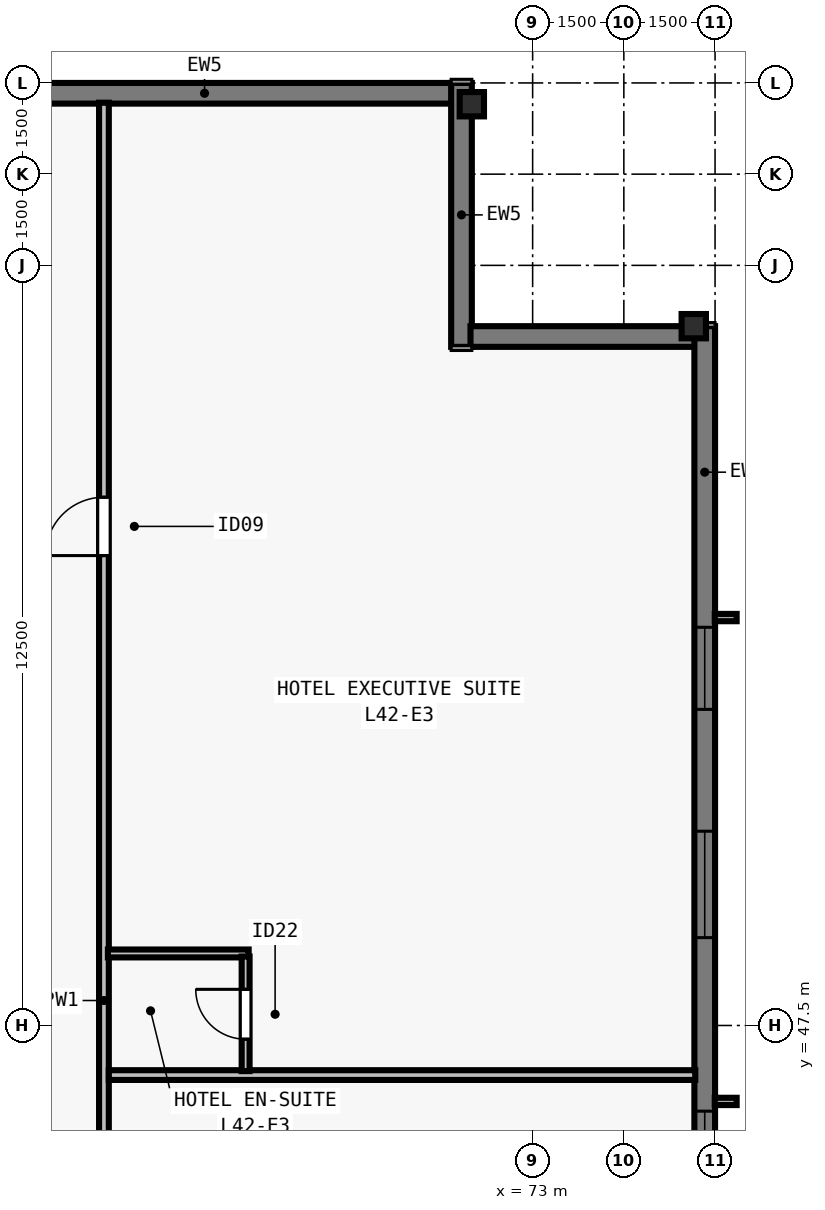
"""IFC4 building model, lengths in metres.
Left out: names, types, materials, properties, quantities, classifications, styles, units other than length and angle.
Written with IfcOpenShell. Run it as: python <this file> out.ifc"""

import sys

from ifc_helpers import new_model, si_unit, direction, frame, frame_2d, origin, origin_2d, place, context, subcontext, project, spatial, rectangle, i_section, extrude, element, fill, save


model = new_model("IFC4")
c1 = context("Model", 3, precision=1e-05, world=origin(), true_north=direction((0.0, 1.0)))
c2 = subcontext(c1, "Body", "Model", "MODEL_VIEW")
j1 = project(units=[si_unit("LENGTHUNIT", "METRE"), si_unit("PLANEANGLEUNIT", "RADIAN")], contexts=[c1])
p1 = place(None, origin())
s1 = spatial("IfcSite", under=j1, at=p1, CompositionType="ELEMENT")
p2 = place(p1, origin())
s2 = spatial("IfcBuilding", under=s1, at=p2, CompositionType="ELEMENT")
p3 = place(p2, frame((0.0, 0.0, 155.0)))
s3 = spatial("IfcBuildingStorey", under=s2, at=p3, CompositionType="ELEMENT", Elevation=155.0)
for number, where, z_axis, x_axis in (
    (1, (75.65, 59.0, 0.0), (0.0, 0.0, 1.0), (0.0, 1.0, 0.0)),
    (2, (72.0, 62.65, 0.0), (0.0, 0.0, 1.0), (1.0, 0.0, 0.0)),
):
    element("IfcColumn", number, at=place(p3, frame(where, z_axis=z_axis, x_axis=x_axis)), inside=s3, PredefinedType="COLUMN", context=c2, shape_type="SweptSolid", body=[
        extrude(i_section(OverallWidth=0.4, OverallDepth=0.4, WebThickness=0.022, FlangeThickness=0.036, at=origin_2d()), origin(), (0.0, 0.0, 1.0), 3.5),
    ])
p4 = place(p3, frame((32.0, 62.83, 0.0), z_axis=(0.0, 0.0, 1.0), x_axis=(1.0, 0.0, 0.0)))
e3 = element("IfcWall", 3, at=p4, inside=s3, PredefinedType="SOLIDWALL", context=c2, shape_type="SweptSolid", body=[
    extrude(rectangle(XDim=39.682, YDim=0.34, at=frame_2d((19.841, 0.0))), origin(), (0.0, 0.0, 1.0), 3.28),
])
p5 = place(p4, frame((4.952, 0.0, 0.8)))
e4 = element("IfcOpeningElement", 4, at=p5, cuts=e3, PredefinedType="OPENING", context=c2, shape_type="SweptSolid", body=[
    extrude(rectangle(XDim=1.35, YDim=1.66, at=frame_2d((0.675, 0.83))), frame((0.0, 0.18, 0.0), z_axis=(0.0, -1.0, 0.0), x_axis=(1.0, 0.0, 0.0)), (0.0, 0.0, 1.0), 0.36),
])
p6 = place(p4, frame((12.059, 0.0, 0.8)))
e5 = element("IfcOpeningElement", 5, at=p6, cuts=e3, PredefinedType="OPENING", context=c2, shape_type="SweptSolid", body=[
    extrude(rectangle(XDim=1.35, YDim=1.66, at=frame_2d((0.675, 0.83))), frame((0.0, 0.18, 0.0), z_axis=(0.0, -1.0, 0.0), x_axis=(1.0, 0.0, 0.0)), (0.0, 0.0, 1.0), 0.36),
])
p7 = place(p4, frame((16.262, 0.0, 0.8)))
e6 = element("IfcOpeningElement", 6, at=p7, cuts=e3, PredefinedType="OPENING", context=c2, shape_type="SweptSolid", body=[
    extrude(rectangle(XDim=1.75, YDim=1.66, at=frame_2d((0.875, 0.83))), frame((0.0, 0.18, 0.0), z_axis=(0.0, -1.0, 0.0), x_axis=(1.0, 0.0, 0.0)), (0.0, 0.0, 1.0), 0.36),
])
p8 = place(p4, frame((18.316, 0.0, 0.8)))
e7 = element("IfcOpeningElement", 7, at=p8, cuts=e3, PredefinedType="OPENING", context=c2, shape_type="SweptSolid", body=[
    extrude(rectangle(XDim=1.35, YDim=1.66, at=frame_2d((0.675, 0.83))), frame((0.0, 0.18, 0.0), z_axis=(0.0, -1.0, 0.0), x_axis=(1.0, 0.0, 0.0)), (0.0, 0.0, 1.0), 0.36),
])
p9 = place(p4, frame((22.07, 0.0, 0.8)))
e8 = element("IfcOpeningElement", 8, at=p9, cuts=e3, PredefinedType="OPENING", context=c2, shape_type="SweptSolid", body=[
    extrude(rectangle(XDim=1.75, YDim=1.66, at=frame_2d((0.875, 0.83))), frame((0.0, 0.18, 0.0), z_axis=(0.0, -1.0, 0.0), x_axis=(1.0, 0.0, 0.0)), (0.0, 0.0, 1.0), 0.36),
])
p10 = place(p4, frame((26.273, 0.0, 0.8)))
e9 = element("IfcOpeningElement", 9, at=p10, cuts=e3, PredefinedType="OPENING", context=c2, shape_type="SweptSolid", body=[
    extrude(rectangle(XDim=1.35, YDim=1.66, at=frame_2d((0.675, 0.83))), frame((0.0, 0.18, 0.0), z_axis=(0.0, -1.0, 0.0), x_axis=(1.0, 0.0, 0.0)), (0.0, 0.0, 1.0), 0.36),
])
p11 = place(p4, frame((29.627, 0.0, 0.8)))
e10 = element("IfcOpeningElement", 10, at=p11, cuts=e3, PredefinedType="OPENING", context=c2, shape_type="SweptSolid", body=[
    extrude(rectangle(XDim=1.75, YDim=1.66, at=frame_2d((0.875, 0.83))), frame((0.0, 0.18, 0.0), z_axis=(0.0, -1.0, 0.0), x_axis=(1.0, 0.0, 0.0)), (0.0, 0.0, 1.0), 0.36),
])
p12 = place(p3, frame((71.83, 63.0, 0.0), z_axis=(0.0, 0.0, 1.0), x_axis=(0.0, -1.0, 0.0)))
e11 = element("IfcWall", 11, at=p12, inside=s3, PredefinedType="SOLIDWALL", context=c2, shape_type="SweptSolid", body=[
    extrude(rectangle(XDim=4.34, YDim=0.34, at=frame_2d((2.17, 0.0))), origin(), (0.0, 0.0, 1.0), 3.28),
])
p13 = place(p3, frame((71.978, 58.83, 0.0), z_axis=(0.0, 0.0, 1.0), x_axis=(1.0, 0.0, 0.0)))
e12 = element("IfcWall", 12, at=p13, inside=s3, PredefinedType="SOLIDWALL", context=c2, shape_type="SweptSolid", body=[
    extrude(rectangle(XDim=3.704, YDim=0.34, at=frame_2d((1.852, 0.0))), origin(), (0.0, 0.0, 1.0), 3.28),
])
p14 = place(p3, frame((75.83, 59.0, 0.0), z_axis=(0.0, 0.0, 1.0), x_axis=(0.0, -1.0, 0.0)))
e13 = element("IfcWall", 13, at=p14, inside=s3, PredefinedType="SOLIDWALL", context=c2, shape_type="SweptSolid", body=[
    extrude(rectangle(XDim=39.682, YDim=0.34, at=frame_2d((19.841, 0.0))), origin(), (0.0, 0.0, 1.0), 3.28),
])
p15 = place(p14, frame((4.952, 0.0, 0.8)))
e14 = element("IfcOpeningElement", 14, at=p15, cuts=e13, PredefinedType="OPENING", context=c2, shape_type="SweptSolid", body=[
    extrude(rectangle(XDim=1.35, YDim=1.66, at=frame_2d((0.675, 0.83))), frame((0.0, 0.18, 0.0), z_axis=(0.0, -1.0, 0.0), x_axis=(1.0, 0.0, 0.0)), (0.0, 0.0, 1.0), 0.36),
])
p16 = place(p14, frame((8.305, 0.0, 0.8)))
e15 = element("IfcOpeningElement", 15, at=p16, cuts=e13, PredefinedType="OPENING", context=c2, shape_type="SweptSolid", body=[
    extrude(rectangle(XDim=1.75, YDim=1.66, at=frame_2d((0.875, 0.83))), frame((0.0, 0.18, 0.0), z_axis=(0.0, -1.0, 0.0), x_axis=(1.0, 0.0, 0.0)), (0.0, 0.0, 1.0), 0.36),
])
p17 = place(p14, frame((12.909, 0.0, 0.8)))
e16 = element("IfcOpeningElement", 16, at=p17, cuts=e13, PredefinedType="OPENING", context=c2, shape_type="SweptSolid", body=[
    extrude(rectangle(XDim=1.35, YDim=1.66, at=frame_2d((0.675, 0.83))), frame((0.0, 0.18, 0.0), z_axis=(0.0, -1.0, 0.0), x_axis=(1.0, 0.0, 0.0)), (0.0, 0.0, 1.0), 0.36),
])
p18 = place(p14, frame((16.262, 0.0, 0.8)))
e17 = element("IfcOpeningElement", 17, at=p18, cuts=e13, PredefinedType="OPENING", context=c2, shape_type="SweptSolid", body=[
    extrude(rectangle(XDim=1.75, YDim=1.66, at=frame_2d((0.875, 0.83))), frame((0.0, 0.18, 0.0), z_axis=(0.0, -1.0, 0.0), x_axis=(1.0, 0.0, 0.0)), (0.0, 0.0, 1.0), 0.36),
])
p19 = place(p14, frame((19.166, 0.0, 0.8)))
e18 = element("IfcOpeningElement", 18, at=p19, cuts=e13, PredefinedType="OPENING", context=c2, shape_type="SweptSolid", body=[
    extrude(rectangle(XDim=1.35, YDim=1.66, at=frame_2d((0.675, 0.83))), frame((0.0, 0.18, 0.0), z_axis=(0.0, -1.0, 0.0), x_axis=(1.0, 0.0, 0.0)), (0.0, 0.0, 1.0), 0.36),
])
p20 = place(p14, frame((22.07, 0.0, 0.8)))
e19 = element("IfcOpeningElement", 19, at=p20, cuts=e13, PredefinedType="OPENING", context=c2, shape_type="SweptSolid", body=[
    extrude(rectangle(XDim=1.75, YDim=1.66, at=frame_2d((0.875, 0.83))), frame((0.0, 0.18, 0.0), z_axis=(0.0, -1.0, 0.0), x_axis=(1.0, 0.0, 0.0)), (0.0, 0.0, 1.0), 0.36),
])
p21 = place(p14, frame((25.823, 0.0, 0.8)))
e20 = element("IfcOpeningElement", 20, at=p21, cuts=e13, PredefinedType="OPENING", context=c2, shape_type="SweptSolid", body=[
    extrude(rectangle(XDim=1.35, YDim=1.66, at=frame_2d((0.675, 0.83))), frame((0.0, 0.18, 0.0), z_axis=(0.0, -1.0, 0.0), x_axis=(1.0, 0.0, 0.0)), (0.0, 0.0, 1.0), 0.36),
])
p22 = place(p14, frame((29.627, 0.0, 0.8)))
e21 = element("IfcOpeningElement", 21, at=p22, cuts=e13, PredefinedType="OPENING", context=c2, shape_type="SweptSolid", body=[
    extrude(rectangle(XDim=1.75, YDim=1.66, at=frame_2d((0.875, 0.83))), frame((0.0, 0.18, 0.0), z_axis=(0.0, -1.0, 0.0), x_axis=(1.0, 0.0, 0.0)), (0.0, 0.0, 1.0), 0.36),
])
p23 = place(p14, frame((33.38, 0.0, 0.8)))
e22 = element("IfcOpeningElement", 22, at=p23, cuts=e13, PredefinedType="OPENING", context=c2, shape_type="SweptSolid", body=[
    extrude(rectangle(XDim=1.35, YDim=1.66, at=frame_2d((0.675, 0.83))), frame((0.0, 0.18, 0.0), z_axis=(0.0, -1.0, 0.0), x_axis=(1.0, 0.0, 0.0)), (0.0, 0.0, 1.0), 0.36),
])
p24 = place(p3, frame((65.95, 15.325, 0.0), z_axis=(0.0, 0.0, 1.0), x_axis=(0.0, 1.0, 0.0)))
e23 = element("IfcWall", 23, at=p24, inside=s3, PredefinedType="PARTITIONING", context=c2, shape_type="SweptSolid", body=[
    extrude(rectangle(XDim=47.35, YDim=0.16, at=frame_2d((23.675, 0.0))), origin(), (0.0, 0.0, 1.0), 2.555),
])
p25 = place(p24, frame((8.902, 0.0, 0.0)))
e24 = element("IfcOpeningElement", 24, at=p25, cuts=e23, PredefinedType="OPENING", context=c2, shape_type="SweptSolid", body=[
    extrude(rectangle(XDim=0.96, YDim=2.15, at=frame_2d((0.48, 1.075))), frame((0.0, 0.09, 0.0), z_axis=(0.0, -1.0, 0.0), x_axis=(1.0, 0.0, 0.0)), (0.0, 0.0, 1.0), 0.18),
])
p26 = place(p24, frame((24.309, 0.0, 0.0)))
e25 = element("IfcOpeningElement", 25, at=p26, cuts=e23, PredefinedType="OPENING", context=c2, shape_type="SweptSolid", body=[
    extrude(rectangle(XDim=0.96, YDim=2.15, at=frame_2d((0.48, 1.075))), frame((0.0, 0.09, 0.0), z_axis=(0.0, -1.0, 0.0), x_axis=(1.0, 0.0, 0.0)), (0.0, 0.0, 1.0), 0.18),
])
p27 = place(p24, frame((39.902, 0.0, 0.0)))
e26 = element("IfcOpeningElement", 26, at=p27, cuts=e23, PredefinedType="OPENING", context=c2, shape_type="SweptSolid", body=[
    extrude(rectangle(XDim=0.96, YDim=2.15, at=frame_2d((0.48, 1.075))), frame((0.0, 0.09, 0.0), z_axis=(0.0, -1.0, 0.0), x_axis=(1.0, 0.0, 0.0)), (0.0, 0.0, 1.0), 0.18),
])
p28 = place(p3, frame((66.03, 46.685, 0.0), z_axis=(0.0, 0.0, 1.0), x_axis=(1.0, 0.0, 0.0)))
e27 = element("IfcWall", 27, at=p28, inside=s3, PredefinedType="PARTITIONING", context=c2, shape_type="SweptSolid", body=[
    extrude(rectangle(XDim=9.645, YDim=0.16, at=frame_2d((4.823, 0.0))), origin(), (0.0, 0.0, 1.0), 3.28),
])
p29 = place(p3, frame((66.015, 48.685, 0.0), z_axis=(0.0, 0.0, 1.0), x_axis=(1.0, 0.0, 0.0)))
e28 = element("IfcWall", 28, at=p29, inside=s3, PredefinedType="PLUMBINGWALL", context=c2, shape_type="SweptSolid", body=[
    extrude(rectangle(XDim=2.315, YDim=0.13, at=frame_2d((1.158, 0.0))), origin(), (0.0, 0.0, 1.0), 3.28),
])
p30 = place(p3, frame((68.28, 46.75, 0.0), z_axis=(0.0, 0.0, 1.0), x_axis=(0.0, 1.0, 0.0)))
e29 = element("IfcWall", 29, at=p30, inside=s3, PredefinedType="PLUMBINGWALL", context=c2, shape_type="SweptSolid", body=[
    extrude(rectangle(XDim=1.885, YDim=0.13, at=frame_2d((0.942, 0.0))), origin(), (0.0, 0.0, 1.0), 3.28),
])
p31 = place(p30, frame((0.525, 0.0, 0.0)))
e30 = element("IfcOpeningElement", 30, at=p31, cuts=e29, PredefinedType="OPENING", context=c2, shape_type="SweptSolid", body=[
    extrude(rectangle(XDim=0.82, YDim=2.1, at=frame_2d((0.41, 1.05))), frame((0.0, 0.075, 0.0), z_axis=(0.0, -1.0, 0.0), x_axis=(1.0, 0.0, 0.0)), (0.0, 0.0, 1.0), 0.15),
])
p32 = place(p15, origin())
e31 = element("IfcWindow", 31, at=p32, inside=s3, PartitioningType="SINGLE_PANEL", PredefinedType="WINDOW", context=c2, shape_type="SweptSolid", body=[
    extrude(rectangle(XDim=1.35, YDim=1.66, at=frame_2d((0.675, 0.83))), frame((0.0, -0.05, 0.0), z_axis=(0.0, -1.0, 0.0), x_axis=(1.0, 0.0, 0.0)), (0.0, 0.0, 1.0), 0.06),
])
fill(e14, e31)
p33 = place(p16, origin())
e32 = element("IfcWindow", 32, at=p33, inside=s3, PartitioningType="SINGLE_PANEL", PredefinedType="WINDOW", context=c2, shape_type="SweptSolid", body=[
    extrude(rectangle(XDim=1.75, YDim=1.66, at=frame_2d((0.875, 0.83))), frame((0.0, -0.05, 0.0), z_axis=(0.0, -1.0, 0.0), x_axis=(1.0, 0.0, 0.0)), (0.0, 0.0, 1.0), 0.06),
])
fill(e15, e32)
p34 = place(p17, origin())
e33 = element("IfcWindow", 33, at=p34, inside=s3, PartitioningType="SINGLE_PANEL", PredefinedType="WINDOW", context=c2, shape_type="SweptSolid", body=[
    extrude(rectangle(XDim=1.35, YDim=1.66, at=frame_2d((0.675, 0.83))), frame((0.0, -0.05, 0.0), z_axis=(0.0, -1.0, 0.0), x_axis=(1.0, 0.0, 0.0)), (0.0, 0.0, 1.0), 0.06),
])
fill(e16, e33)
p35 = place(p31, origin())
e34 = element("IfcDoor", 34, at=p35, inside=s3, OperationType="SINGLE_SWING_RIGHT", PredefinedType="DOOR", context=c2, shape_type="SweptSolid", body=[
    extrude(rectangle(XDim=0.82, YDim=2.1, at=frame_2d((0.41, 1.05))), frame((0.0, 0.025, 0.0), z_axis=(0.0, -1.0, 0.0), x_axis=(1.0, 0.0, 0.0)), (0.0, 0.0, 1.0), 0.05),
])
fill(e30, e34)
p36 = place(p27, origin())
e35 = element("IfcDoor", 35, at=p36, inside=s3, OperationType="SINGLE_SWING_LEFT", PredefinedType="DOOR", context=c2, shape_type="SweptSolid", body=[
    extrude(rectangle(XDim=0.96, YDim=2.15, at=frame_2d((0.48, 1.075))), frame((0.0, 0.025, 0.0), z_axis=(0.0, -1.0, 0.0), x_axis=(1.0, 0.0, 0.0)), (0.0, 0.0, 1.0), 0.05),
])
fill(e26, e35)
save(model, sys.argv[1])
